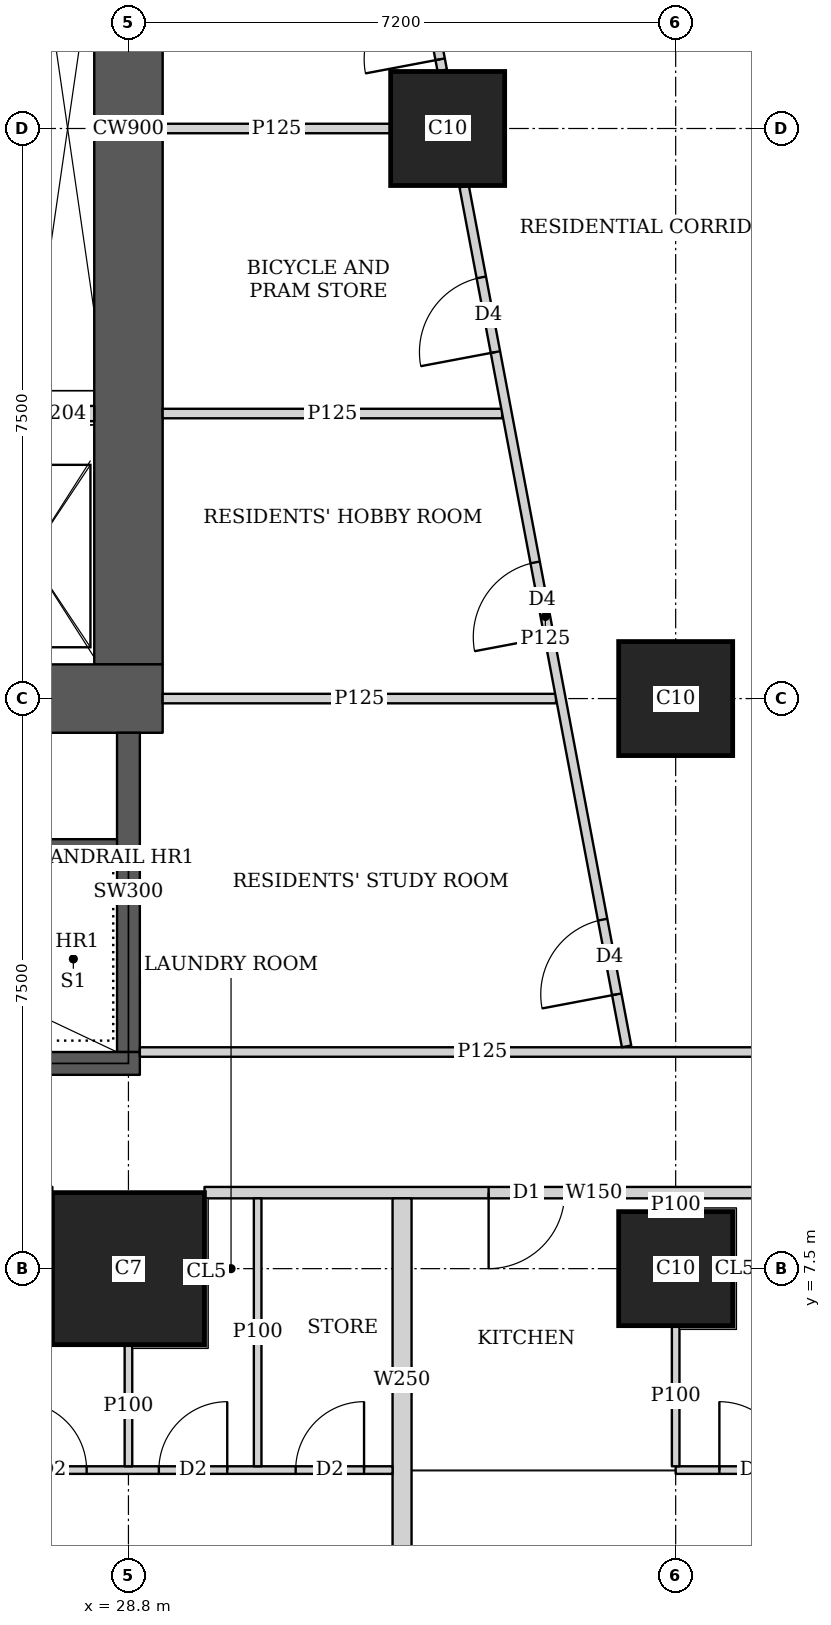
"""IFC4 building model, lengths in metres.
Left out: names, types, materials, properties, quantities, classifications, styles, units other than length and angle.
Written with IfcOpenShell. Run it as: python <this file> out.ifc"""

import sys

from ifc_helpers import new_model, si_unit, direction, frame, frame_2d, origin, origin_2d, place, context, subcontext, project, spatial, rectangle, extrude, element, fill, save


model = new_model("IFC4")
c1 = context("Model", 3, precision=1e-05, world=origin(), true_north=direction((0.0, 1.0)))
c2 = subcontext(c1, "Body", "Model", "MODEL_VIEW")
j1 = project(units=[si_unit("LENGTHUNIT", "METRE"), si_unit("PLANEANGLEUNIT", "RADIAN")], contexts=[c1])
p1 = place(None, origin())
s1 = spatial("IfcSite", under=j1, at=p1, CompositionType="ELEMENT")
p2 = place(p1, origin())
s2 = spatial("IfcBuilding", under=s1, at=p2, CompositionType="ELEMENT")
p3 = place(p2, frame((0.0, 0.0, 135.8)))
s3 = spatial("IfcBuildingStorey", under=s2, at=p3, CompositionType="ELEMENT", Elevation=135.8)
p4 = place(p3, frame((28.8, 7.5, 0.0), z_axis=(0.0, 0.0, 1.0), x_axis=(1.0, 0.0, 0.0)))
e1 = element("IfcColumn", 1, at=p4, inside=s3, PredefinedType="COLUMN", context=c2, shape_type="SweptSolid", body=[
    extrude(rectangle(XDim=2.0, YDim=2.0, at=origin_2d()), origin(), (0.0, 0.0, 1.0), 3.75),
])
for number, where, z_axis, x_axis in (
    (2, (36.0, 7.5, 0.0), (0.0, 0.0, 1.0), (1.0, 0.0, 0.0)),
    (3, (36.0, 15.0, 0.0), (0.0, 0.0, 1.0), (1.0, 0.0, 0.0)),
    (4, (33.0, 22.5, 0.0), (0.0, 0.0, 1.0), (1.0, 0.0, 0.0)),
):
    element("IfcColumn", number, at=place(p3, frame(where, z_axis=z_axis, x_axis=x_axis)), inside=s3, PredefinedType="COLUMN", context=c2, shape_type="SweptSolid", body=[
        extrude(rectangle(XDim=1.5, YDim=1.5, at=origin_2d()), origin(), (0.0, 0.0, 1.0), 3.75),
    ])
p5 = place(p3, frame((13.95, 15.0, 0.0), z_axis=(0.0, 0.0, 1.0), x_axis=(1.0, 0.0, 0.0)))
e5 = element("IfcWall", 5, at=p5, inside=s3, PredefinedType="SHEAR", context=c2, shape_type="SweptSolid", body=[
    extrude(rectangle(XDim=15.3, YDim=0.9, at=frame_2d((7.65, 0.0))), origin(), (0.0, 0.0, 1.0), 3.75),
])
p6 = place(p5, frame((4.45, 0.0, 0.0)))
e6 = element("IfcOpeningElement", 6, at=p6, cuts=e5, PredefinedType="OPENING", context=c2, shape_type="SweptSolid", body=[
    extrude(rectangle(XDim=1.8, YDim=2.1, at=frame_2d((0.9, 1.05))), frame((0.0, 0.46, 0.0), z_axis=(0.0, -1.0, 0.0), x_axis=(1.0, 0.0, 0.0)), (0.0, 0.0, 1.0), 0.92),
])
p7 = place(p5, frame((10.7, 0.0, 0.0)))
e7 = element("IfcOpeningElement", 7, at=p7, cuts=e5, PredefinedType="OPENING", context=c2, shape_type="SweptSolid", body=[
    extrude(rectangle(XDim=1.1, YDim=2.1, at=frame_2d((0.55, 1.05))), frame((0.0, 0.46, 0.0), z_axis=(0.0, -1.0, 0.0), x_axis=(1.0, 0.0, 0.0)), (0.0, 0.0, 1.0), 0.92),
])
p8 = place(p3, frame((28.8, 15.45, 0.0), z_axis=(0.0, 0.0, 1.0), x_axis=(0.0, 1.0, 0.0)))
e8 = element("IfcWall", 8, at=p8, inside=s3, PredefinedType="SHEAR", context=c2, shape_type="SweptSolid", body=[
    extrude(rectangle(XDim=14.1, YDim=0.9, at=frame_2d((7.05, 0.0))), origin(), (0.0, 0.0, 1.0), 3.75),
])
p9 = place(p3, frame((21.45, 10.2, 0.0), z_axis=(0.0, 0.0, 1.0), x_axis=(1.0, 0.0, 0.0)))
e9 = element("IfcWall", 9, at=p9, inside=s3, PredefinedType="SHEAR", context=c2, shape_type="SweptSolid", body=[
    extrude(rectangle(XDim=7.5, YDim=0.3, at=frame_2d((3.75, 0.0))), origin(), (0.0, 0.0, 1.0), 3.75),
])
p10 = place(p9, frame((0.5, 0.0, 0.0)))
e10 = element("IfcOpeningElement", 10, at=p10, cuts=e9, PredefinedType="OPENING", context=c2, shape_type="SweptSolid", body=[
    extrude(rectangle(XDim=1.1, YDim=2.1, at=frame_2d((0.55, 1.05))), frame((0.0, 0.16, 0.0), z_axis=(0.0, -1.0, 0.0), x_axis=(1.0, 0.0, 0.0)), (0.0, 0.0, 1.0), 0.32),
])
p11 = place(p3, frame((28.8, 10.35, 0.0), z_axis=(0.0, 0.0, 1.0), x_axis=(0.0, 1.0, 0.0)))
e11 = element("IfcWall", 11, at=p11, inside=s3, PredefinedType="SHEAR", context=c2, shape_type="SweptSolid", body=[
    extrude(rectangle(XDim=4.2, YDim=0.3, at=frame_2d((2.1, 0.0))), origin(), (0.0, 0.0, 1.0), 3.75),
])
p12 = place(p3, frame((40.053, 8.5, 0.0), z_axis=(0.0, 0.0, 1.0), x_axis=(-1.0, 0.0, 0.0)))
e12 = element("IfcWall", 12, at=p12, inside=s3, PredefinedType="SOLIDWALL", context=c2, shape_type="SweptSolid", body=[
    extrude(rectangle(XDim=10.252, YDim=0.15, at=frame_2d((5.126, 0.0))), origin(), (0.0, 0.0, 1.0), 3.5),
])
p13 = place(p12, frame((5.514, 0.0, 0.0)))
e13 = element("IfcOpeningElement", 13, at=p13, cuts=e12, PredefinedType="OPENING", context=c2, shape_type="SweptSolid", body=[
    extrude(rectangle(XDim=1.0, YDim=2.1, at=frame_2d((0.5, 1.05))), frame((0.0, 0.085, 0.0), z_axis=(0.0, -1.0, 0.0), x_axis=(1.0, 0.0, 0.0)), (0.0, 0.0, 1.0), 0.17),
])
p14 = place(p3, frame((33.623, 43.022, 0.0), z_axis=(0.0, 0.0, 1.0), x_axis=(0.185596841028, -0.98262597798, 0.0)))
e14 = element("IfcWall", 14, at=p14, inside=s3, PredefinedType="SOLIDWALL", context=c2, shape_type="SweptSolid", body=[
    extrude(rectangle(XDim=41.66, YDim=0.15, at=frame_2d((20.83, 0.0))), origin(), (0.0, 0.0, 1.0), 2.5),
])
p15 = place(p14, frame((20.242, 0.0, 0.0)))
e15 = element("IfcOpeningElement", 15, at=p15, cuts=e14, PredefinedType="OPENING", context=c2, shape_type="SweptSolid", body=[
    extrude(rectangle(XDim=1.0, YDim=2.1, at=frame_2d((0.5, 1.05))), frame((0.0, 0.085, 0.0), z_axis=(0.0, -1.0, 0.0), x_axis=(1.0, 0.0, 0.0)), (0.0, 0.0, 1.0), 0.17),
])
p16 = place(p14, frame((24.714, 0.0, 0.0)))
e16 = element("IfcOpeningElement", 16, at=p16, cuts=e14, PredefinedType="OPENING", context=c2, shape_type="SweptSolid", body=[
    extrude(rectangle(XDim=1.0, YDim=2.1, at=frame_2d((0.5, 1.05))), frame((0.0, 0.085, 0.0), z_axis=(0.0, -1.0, 0.0), x_axis=(1.0, 0.0, 0.0)), (0.0, 0.0, 1.0), 0.17),
])
p17 = place(p14, frame((31.206, 0.0, 0.0)))
e17 = element("IfcOpeningElement", 17, at=p17, cuts=e14, PredefinedType="OPENING", context=c2, shape_type="SweptSolid", body=[
    extrude(rectangle(XDim=1.0, YDim=2.1, at=frame_2d((0.5, 1.05))), frame((0.0, 0.085, 0.0), z_axis=(0.0, -1.0, 0.0), x_axis=(1.0, 0.0, 0.0)), (0.0, 0.0, 1.0), 0.17),
])
p18 = place(p3, frame((32.275, 4.85, 0.0), z_axis=(0.0, 0.0, 1.0), x_axis=(-1.0, 0.0, 0.0)))
e18 = element("IfcWall", 18, at=p18, inside=s3, PredefinedType="PARTITIONING", context=c2, shape_type="SweptSolid", body=[
    extrude(rectangle(XDim=10.675, YDim=0.1, at=frame_2d((5.337, 0.0))), origin(), (0.0, 0.0, 1.0), 3.5),
])
p19 = place(p18, frame((9.2, 0.0, 0.0)))
e19 = element("IfcOpeningElement", 19, at=p19, cuts=e18, PredefinedType="OPENING", context=c2, shape_type="SweptSolid", body=[
    extrude(rectangle(XDim=0.9, YDim=2.1, at=frame_2d((0.45, 1.05))), frame((0.0, 0.06, 0.0), z_axis=(0.0, -1.0, 0.0), x_axis=(1.0, 0.0, 0.0)), (0.0, 0.0, 1.0), 0.12),
])
p20 = place(p18, frame((5.825, 0.0, 0.0)))
e20 = element("IfcOpeningElement", 20, at=p20, cuts=e18, PredefinedType="OPENING", context=c2, shape_type="SweptSolid", body=[
    extrude(rectangle(XDim=0.9, YDim=2.1, at=frame_2d((0.45, 1.05))), frame((0.0, 0.06, 0.0), z_axis=(0.0, -1.0, 0.0), x_axis=(1.0, 0.0, 0.0)), (0.0, 0.0, 1.0), 0.12),
])
p21 = place(p18, frame((2.175, 0.0, 0.0)))
e21 = element("IfcOpeningElement", 21, at=p21, cuts=e18, PredefinedType="OPENING", context=c2, shape_type="SweptSolid", body=[
    extrude(rectangle(XDim=0.9, YDim=2.1, at=frame_2d((0.45, 1.05))), frame((0.0, 0.06, 0.0), z_axis=(0.0, -1.0, 0.0), x_axis=(1.0, 0.0, 0.0)), (0.0, 0.0, 1.0), 0.12),
])
p22 = place(p18, frame((7.4, 0.0, 0.0)))
e22 = element("IfcOpeningElement", 22, at=p22, cuts=e18, PredefinedType="OPENING", context=c2, shape_type="SweptSolid", body=[
    extrude(rectangle(XDim=0.9, YDim=2.1, at=frame_2d((0.45, 1.05))), frame((0.0, 0.06, 0.0), z_axis=(0.0, -1.0, 0.0), x_axis=(1.0, 0.0, 0.0)), (0.0, 0.0, 1.0), 0.12),
])
p23 = place(p18, frame((4.025, 0.0, 0.0)))
e23 = element("IfcOpeningElement", 23, at=p23, cuts=e18, PredefinedType="OPENING", context=c2, shape_type="SweptSolid", body=[
    extrude(rectangle(XDim=0.9, YDim=2.1, at=frame_2d((0.45, 1.05))), frame((0.0, 0.06, 0.0), z_axis=(0.0, -1.0, 0.0), x_axis=(1.0, 0.0, 0.0)), (0.0, 0.0, 1.0), 0.12),
])
p24 = place(p18, frame((0.375, 0.0, 0.0)))
e24 = element("IfcOpeningElement", 24, at=p24, cuts=e18, PredefinedType="OPENING", context=c2, shape_type="SweptSolid", body=[
    extrude(rectangle(XDim=0.9, YDim=2.1, at=frame_2d((0.45, 1.05))), frame((0.0, 0.06, 0.0), z_axis=(0.0, -1.0, 0.0), x_axis=(1.0, 0.0, 0.0)), (0.0, 0.0, 1.0), 0.12),
])
p25 = place(p3, frame((28.8, 4.9, 0.0), z_axis=(0.0, 0.0, 1.0), x_axis=(0.0, 1.0, 0.0)))
e25 = element("IfcWall", 25, at=p25, inside=s3, PredefinedType="PARTITIONING", context=c2, shape_type="SweptSolid", body=[
    extrude(rectangle(XDim=1.599, YDim=0.1, at=frame_2d((0.8, 0.0))), origin(), (0.0, 0.0, 1.0), 3.5),
])
p26 = place(p3, frame((30.5, 4.9, 0.0), z_axis=(0.0, 0.0, 1.0), x_axis=(0.0, 1.0, 0.0)))
e26 = element("IfcWall", 26, at=p26, inside=s3, PredefinedType="PARTITIONING", context=c2, shape_type="SweptSolid", body=[
    extrude(rectangle(XDim=3.525, YDim=0.1, at=frame_2d((1.763, 0.0))), origin(), (0.0, 0.0, 1.0), 3.5),
])
p27 = place(p3, frame((40.747, 4.85, 0.0), z_axis=(0.0, 0.0, 1.0), x_axis=(-1.0, 0.0, 0.0)))
e27 = element("IfcWall", 27, at=p27, inside=s3, PredefinedType="PARTITIONING", context=c2, shape_type="SweptSolid", body=[
    extrude(rectangle(XDim=4.747, YDim=0.1, at=frame_2d((2.374, 0.0))), origin(), (0.0, 0.0, 1.0), 3.5),
])
p28 = place(p27, frame((3.272, 0.0, 0.0)))
e28 = element("IfcOpeningElement", 28, at=p28, cuts=e27, PredefinedType="OPENING", context=c2, shape_type="SweptSolid", body=[
    extrude(rectangle(XDim=0.9, YDim=2.1, at=frame_2d((0.45, 1.05))), frame((0.0, 0.06, 0.0), z_axis=(0.0, -1.0, 0.0), x_axis=(1.0, 0.0, 0.0)), (0.0, 0.0, 1.0), 0.12),
])
p29 = place(p27, frame((0.15, 0.0, 0.0)))
e29 = element("IfcOpeningElement", 29, at=p29, cuts=e27, PredefinedType="OPENING", context=c2, shape_type="SweptSolid", body=[
    extrude(rectangle(XDim=0.9, YDim=2.1, at=frame_2d((0.45, 1.05))), frame((0.0, 0.06, 0.0), z_axis=(0.0, -1.0, 0.0), x_axis=(1.0, 0.0, 0.0)), (0.0, 0.0, 1.0), 0.12),
])
p30 = place(p27, frame((1.472, 0.0, 0.0)))
e30 = element("IfcOpeningElement", 30, at=p30, cuts=e27, PredefinedType="OPENING", context=c2, shape_type="SweptSolid", body=[
    extrude(rectangle(XDim=0.9, YDim=2.1, at=frame_2d((0.45, 1.05))), frame((0.0, 0.06, 0.0), z_axis=(0.0, -1.0, 0.0), x_axis=(1.0, 0.0, 0.0)), (0.0, 0.0, 1.0), 0.12),
])
p31 = place(p3, frame((36.0, 4.9, 0.0), z_axis=(0.0, 0.0, 1.0), x_axis=(0.0, 1.0, 0.0)))
e31 = element("IfcWall", 31, at=p31, inside=s3, PredefinedType="PARTITIONING", context=c2, shape_type="SweptSolid", body=[
    extrude(rectangle(XDim=1.849, YDim=0.1, at=frame_2d((0.925, 0.0))), origin(), (0.0, 0.0, 1.0), 3.5),
])
p32 = place(p3, frame((36.0, 8.251, 0.0), z_axis=(0.0, 0.0, 1.0), x_axis=(0.0, 1.0, 0.0)))
e32 = element("IfcWall", 32, at=p32, inside=s3, PredefinedType="PARTITIONING", context=c2, shape_type="SweptSolid", body=[
    extrude(rectangle(XDim=0.174, YDim=0.1, at=frame_2d((0.087, 0.0))), origin(), (0.0, 0.0, 1.0), 3.5),
])
p33 = place(p3, frame((32.4, 3.65, 0.0), z_axis=(0.0, 0.0, 1.0), x_axis=(0.0, 1.0, 0.0)))
e33 = element("IfcWall", 33, at=p33, inside=s3, PredefinedType="SOLIDWALL", context=c2, shape_type="SweptSolid", body=[
    extrude(rectangle(XDim=4.775, YDim=0.25, at=frame_2d((2.388, 0.0))), origin(), (0.0, 0.0, 1.0), 3.5),
])
p34 = place(p3, frame((28.95, 10.35, 0.0), z_axis=(0.0, 0.0, 1.0), x_axis=(1.0, 0.0, 0.0)))
e34 = element("IfcWall", 34, at=p34, inside=s3, PredefinedType="PARTITIONING", context=c2, shape_type="SweptSolid", body=[
    extrude(rectangle(XDim=9.013, YDim=0.125, at=frame_2d((4.506, 0.0))), origin(), (0.0, 0.0, 1.0), 3.5),
])
p35 = place(p3, frame((35.354, 10.424, 0.0), z_axis=(0.0, 0.0, 1.0), x_axis=(-0.185612234763, 0.982623070311, 0.0)))
e35 = element("IfcWall", 35, at=p35, inside=s3, PredefinedType="PARTITIONING", context=c2, shape_type="SweptSolid", body=[
    extrude(rectangle(XDim=11.513, YDim=0.125, at=frame_2d((5.756, 0.0))), origin(), (0.0, 0.0, 1.0), 3.5),
])
p36 = place(p35, frame((0.697, 0.0, 0.0)))
e36 = element("IfcOpeningElement", 36, at=p36, cuts=e35, PredefinedType="OPENING", context=c2, shape_type="SweptSolid", body=[
    extrude(rectangle(XDim=1.0, YDim=2.1, at=frame_2d((0.5, 1.05))), frame((0.0, 0.073, 0.0), z_axis=(0.0, -1.0, 0.0), x_axis=(1.0, 0.0, 0.0)), (0.0, 0.0, 1.0), 0.145),
])
p37 = place(p35, frame((5.48, 0.0, 0.0)))
e37 = element("IfcOpeningElement", 37, at=p37, cuts=e35, PredefinedType="OPENING", context=c2, shape_type="SweptSolid", body=[
    extrude(rectangle(XDim=1.0, YDim=2.1, at=frame_2d((0.5, 1.05))), frame((0.0, 0.073, 0.0), z_axis=(0.0, -1.0, 0.0), x_axis=(1.0, 0.0, 0.0)), (0.0, 0.0, 1.0), 0.145),
])
p38 = place(p35, frame((9.296, 0.0, 0.0)))
e38 = element("IfcOpeningElement", 38, at=p38, cuts=e35, PredefinedType="OPENING", context=c2, shape_type="SweptSolid", body=[
    extrude(rectangle(XDim=1.0, YDim=2.1, at=frame_2d((0.5, 1.05))), frame((0.0, 0.073, 0.0), z_axis=(0.0, -1.0, 0.0), x_axis=(1.0, 0.0, 0.0)), (0.0, 0.0, 1.0), 0.145),
])
p39 = place(p3, frame((32.929, 23.263, 0.0), z_axis=(0.0, 0.0, 1.0), x_axis=(-0.185612234763, 0.982623070311, 0.0)))
e39 = element("IfcWall", 39, at=p39, inside=s3, PredefinedType="PARTITIONING", context=c2, shape_type="SweptSolid", body=[
    extrude(rectangle(XDim=11.513, YDim=0.125, at=frame_2d((5.756, 0.0))), origin(), (0.0, 0.0, 1.0), 3.5),
])
p40 = place(p39, frame((0.15, 0.0, 0.0)))
e40 = element("IfcOpeningElement", 40, at=p40, cuts=e39, PredefinedType="OPENING", context=c2, shape_type="SweptSolid", body=[
    extrude(rectangle(XDim=1.0, YDim=2.1, at=frame_2d((0.5, 1.05))), frame((0.0, 0.073, 0.0), z_axis=(0.0, -1.0, 0.0), x_axis=(1.0, 0.0, 0.0)), (0.0, 0.0, 1.0), 0.145),
])
p41 = place(p39, frame((7.679, 0.0, 0.0)))
e41 = element("IfcOpeningElement", 41, at=p41, cuts=e39, PredefinedType="OPENING", context=c2, shape_type="SweptSolid", body=[
    extrude(rectangle(XDim=1.0, YDim=2.1, at=frame_2d((0.5, 1.05))), frame((0.0, 0.073, 0.0), z_axis=(0.0, -1.0, 0.0), x_axis=(1.0, 0.0, 0.0)), (0.0, 0.0, 1.0), 0.145),
])
p42 = place(p3, frame((29.25, 15.0, 0.0), z_axis=(0.0, 0.0, 1.0), x_axis=(1.0, 0.0, 0.0)))
e42 = element("IfcWall", 42, at=p42, inside=s3, PredefinedType="PARTITIONING", context=c2, shape_type="SweptSolid", body=[
    extrude(rectangle(XDim=5.176, YDim=0.125, at=frame_2d((2.588, 0.0))), origin(), (0.0, 0.0, 1.0), 3.5),
])
p43 = place(p3, frame((29.25, 18.75, 0.0), z_axis=(0.0, 0.0, 1.0), x_axis=(1.0, 0.0, 0.0)))
e43 = element("IfcWall", 43, at=p43, inside=s3, PredefinedType="PARTITIONING", context=c2, shape_type="SweptSolid", body=[
    extrude(rectangle(XDim=4.467, YDim=0.125, at=frame_2d((2.233, 0.0))), origin(), (0.0, 0.0, 1.0), 3.5),
])
p44 = place(p3, frame((29.25, 22.5, 0.0), z_axis=(0.0, 0.0, 1.0), x_axis=(1.0, 0.0, 0.0)))
e44 = element("IfcWall", 44, at=p44, inside=s3, PredefinedType="PARTITIONING", context=c2, shape_type="SweptSolid", body=[
    extrude(rectangle(XDim=2.999, YDim=0.125, at=frame_2d((1.5, 0.0))), origin(), (0.0, 0.0, 1.0), 3.5),
])
p45 = place(p3, frame((23.0, 13.05, 0.0), z_axis=(0.0, 0.0, 1.0), x_axis=(1.0, 0.0, 0.0)))
e45 = element("IfcWall", 45, at=p45, inside=s3, PredefinedType="SHEAR", context=c2, shape_type="SweptSolid", body=[
    extrude(rectangle(XDim=5.8, YDim=0.2, at=frame_2d((2.9, 0.0))), origin(), (0.0, 0.0, 1.0), 3.75),
])
p46 = place(p3, frame((27.4, 18.75, 0.0), z_axis=(0.0, 0.0, 1.0), x_axis=(1.0, 0.0, 0.0)))
e46 = element("IfcWall", 46, at=p46, inside=s3, PredefinedType="SOLIDWALL", context=c2, shape_type="SweptSolid", body=[
    extrude(rectangle(XDim=0.95, YDim=0.2, at=frame_2d((0.475, 0.0))), origin(), (0.0, 0.0, 1.0), 3.5),
])
p47 = place(p21, origin())
e47 = element("IfcDoor", 47, at=p47, inside=s3, OperationType="SINGLE_SWING_RIGHT", PredefinedType="DOOR", context=c2, shape_type="SweptSolid", body=[
    extrude(rectangle(XDim=0.9, YDim=2.1, at=frame_2d((0.45, 1.05))), frame((0.0, 0.025, 0.0), z_axis=(0.0, -1.0, 0.0), x_axis=(1.0, 0.0, 0.0)), (0.0, 0.0, 1.0), 0.05),
])
fill(e21, e47)
p48 = place(p23, origin())
e48 = element("IfcDoor", 48, at=p48, inside=s3, OperationType="SINGLE_SWING_LEFT", PredefinedType="DOOR", context=c2, shape_type="SweptSolid", body=[
    extrude(rectangle(XDim=0.9, YDim=2.1, at=frame_2d((0.45, 1.05))), frame((0.0, 0.025, 0.0), z_axis=(0.0, -1.0, 0.0), x_axis=(1.0, 0.0, 0.0)), (0.0, 0.0, 1.0), 0.05),
])
fill(e23, e48)
p49 = place(p24, origin())
e49 = element("IfcDoor", 49, at=p49, inside=s3, OperationType="SINGLE_SWING_RIGHT", PredefinedType="DOOR", context=c2, shape_type="SweptSolid", body=[
    extrude(rectangle(XDim=0.9, YDim=2.1, at=frame_2d((0.45, 1.05))), frame((0.0, 0.025, 0.0), z_axis=(0.0, -1.0, 0.0), x_axis=(1.0, 0.0, 0.0)), (0.0, 0.0, 1.0), 0.05),
])
fill(e24, e49)
p50 = place(p28, origin())
e50 = element("IfcDoor", 50, at=p50, inside=s3, OperationType="SINGLE_SWING_LEFT", PredefinedType="DOOR", context=c2, shape_type="SweptSolid", body=[
    extrude(rectangle(XDim=0.9, YDim=2.1, at=frame_2d((0.45, 1.05))), frame((0.0, 0.025, 0.0), z_axis=(0.0, -1.0, 0.0), x_axis=(1.0, 0.0, 0.0)), (0.0, 0.0, 1.0), 0.05),
])
fill(e28, e50)
p51 = place(p13, origin())
e51 = element("IfcDoor", 51, at=p51, inside=s3, OperationType="SINGLE_SWING_RIGHT", PredefinedType="DOOR", context=c2, shape_type="SweptSolid", body=[
    extrude(rectangle(XDim=1.0, YDim=2.1, at=frame_2d((0.5, 1.05))), frame((0.0, 0.025, 0.0), z_axis=(0.0, -1.0, 0.0), x_axis=(1.0, 0.0, 0.0)), (0.0, 0.0, 1.0), 0.05),
])
fill(e13, e51)
p52 = place(p36, origin())
e52 = element("IfcDoor", 52, at=p52, inside=s3, OperationType="SINGLE_SWING_LEFT", PredefinedType="DOOR", context=c2, shape_type="SweptSolid", body=[
    extrude(rectangle(XDim=1.0, YDim=2.1, at=frame_2d((0.5, 1.05))), frame((0.0, 0.025, 0.0), z_axis=(0.0, -1.0, 0.0), x_axis=(1.0, 0.0, 0.0)), (0.0, 0.0, 1.0), 0.05),
])
fill(e36, e52)
p53 = place(p37, origin())
e53 = element("IfcDoor", 53, at=p53, inside=s3, OperationType="SINGLE_SWING_LEFT", PredefinedType="DOOR", context=c2, shape_type="SweptSolid", body=[
    extrude(rectangle(XDim=1.0, YDim=2.1, at=frame_2d((0.5, 1.05))), frame((0.0, 0.025, 0.0), z_axis=(0.0, -1.0, 0.0), x_axis=(1.0, 0.0, 0.0)), (0.0, 0.0, 1.0), 0.05),
])
fill(e37, e53)
p54 = place(p38, origin())
e54 = element("IfcDoor", 54, at=p54, inside=s3, OperationType="SINGLE_SWING_LEFT", PredefinedType="DOOR", context=c2, shape_type="SweptSolid", body=[
    extrude(rectangle(XDim=1.0, YDim=2.1, at=frame_2d((0.5, 1.05))), frame((0.0, 0.025, 0.0), z_axis=(0.0, -1.0, 0.0), x_axis=(1.0, 0.0, 0.0)), (0.0, 0.0, 1.0), 0.05),
])
fill(e38, e54)
p55 = place(p40, origin())
e55 = element("IfcDoor", 55, at=p55, inside=s3, OperationType="SINGLE_SWING_LEFT", PredefinedType="DOOR", context=c2, shape_type="SweptSolid", body=[
    extrude(rectangle(XDim=1.0, YDim=2.1, at=frame_2d((0.5, 1.05))), frame((0.0, 0.025, 0.0), z_axis=(0.0, -1.0, 0.0), x_axis=(1.0, 0.0, 0.0)), (0.0, 0.0, 1.0), 0.05),
])
fill(e40, e55)
save(model, sys.argv[1])
